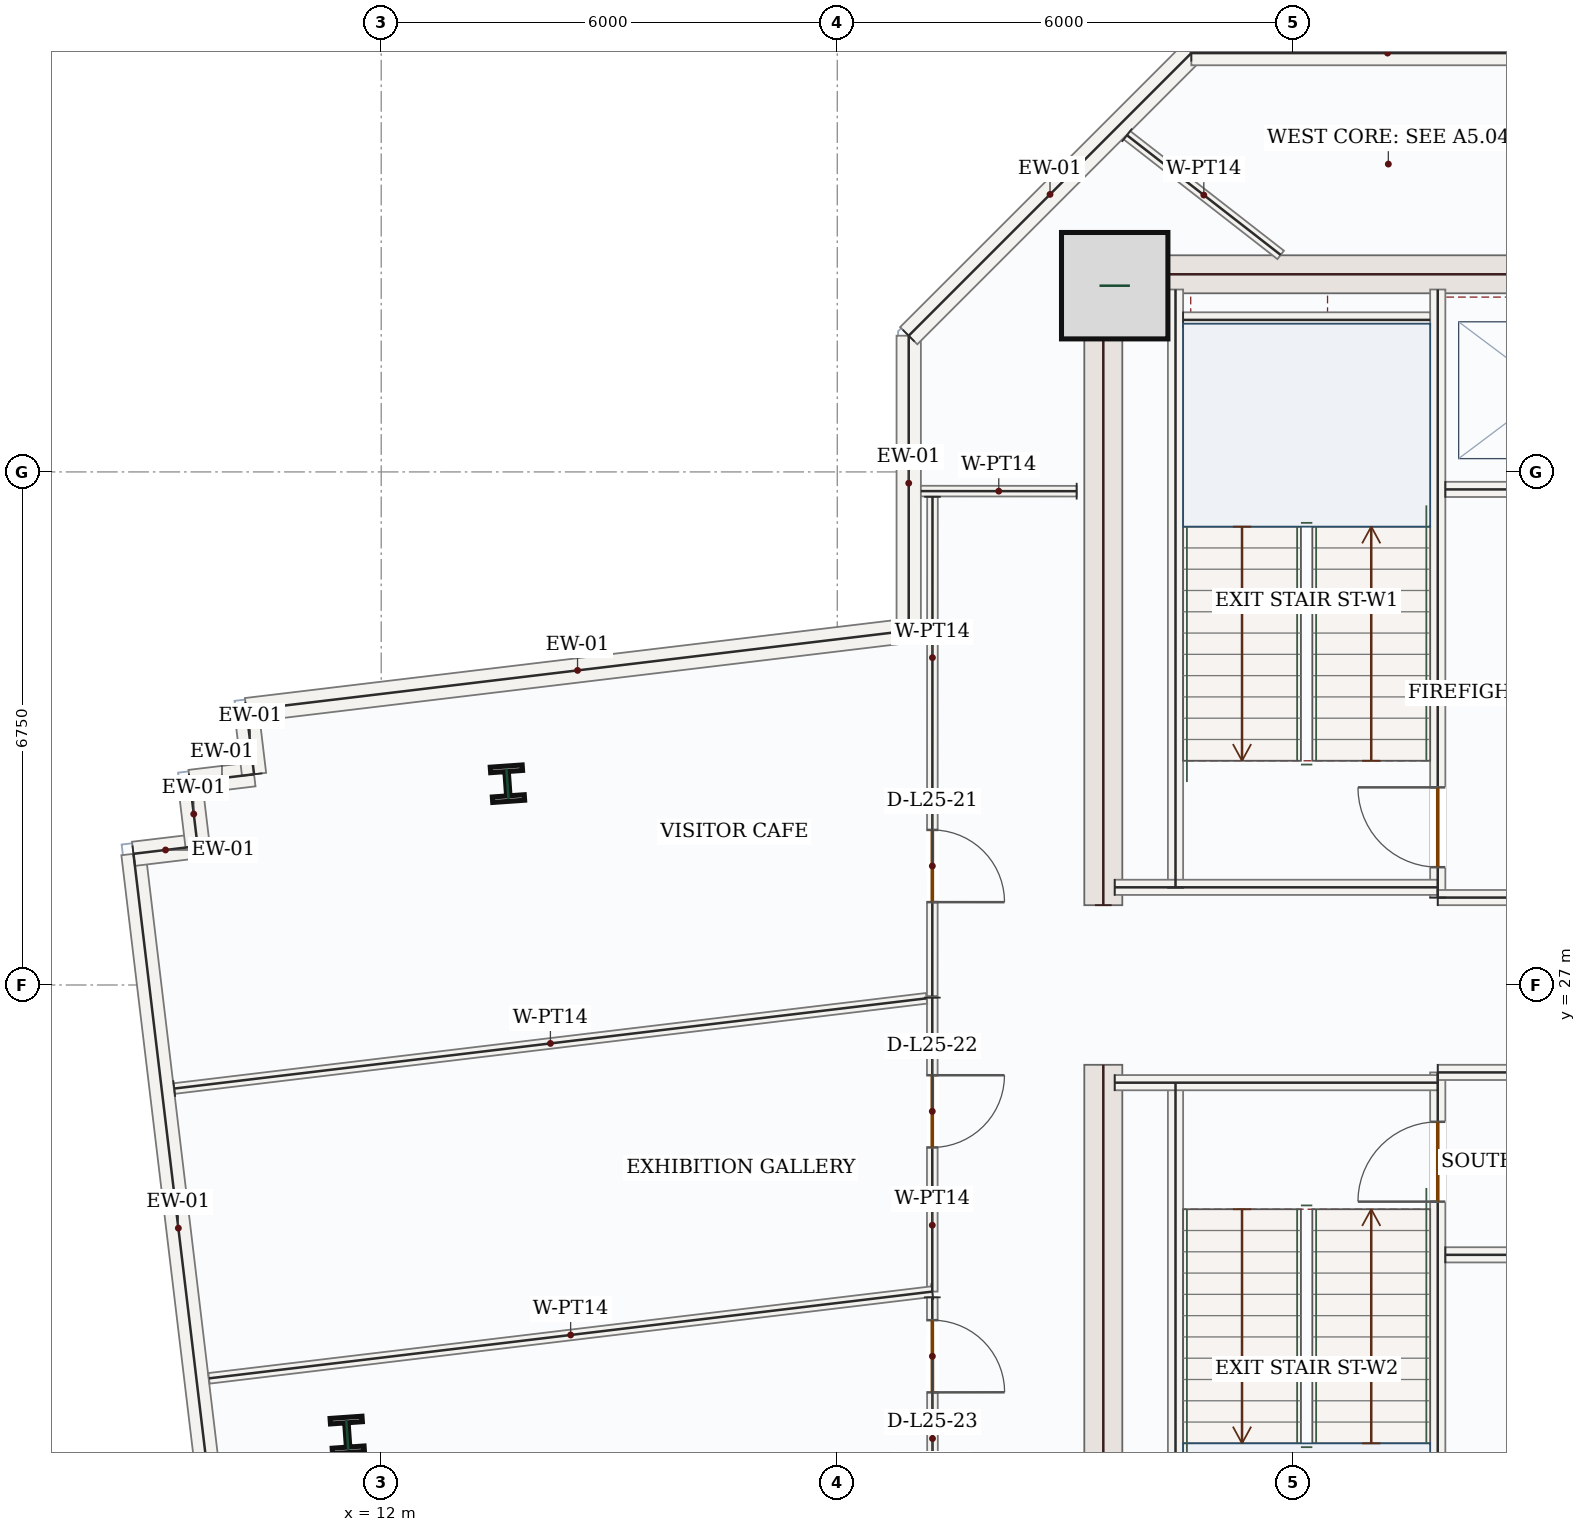
"""IFC4 building model, lengths in metres.
Left out: names, types, materials, properties, quantities, classifications, styles, units other than length and angle.
Written with IfcOpenShell. Run it as: python <this file> out.ifc"""

import sys

from ifc_helpers import new_model, si_unit, direction, frame, frame_2d, origin, origin_2d, place, context, subcontext, project, spatial, rectangle, i_section, extrude, source, transform, mapped, element, fill, save


model = new_model("IFC4")
c1 = context("Model", 3, precision=1e-05, world=origin(), true_north=direction((0.0, 1.0)))
c2 = subcontext(c1, "Body", "Model", "MODEL_VIEW")
j1 = project(units=[si_unit("LENGTHUNIT", "METRE"), si_unit("PLANEANGLEUNIT", "RADIAN")], contexts=[c1])
p1 = place(None, origin())
s1 = spatial("IfcSite", under=j1, at=p1, CompositionType="ELEMENT")
p2 = place(p1, origin())
s2 = spatial("IfcBuilding", under=s1, at=p2, CompositionType="ELEMENT")
p3 = place(p2, frame((0.0, 0.0, 113.1)))
s3 = spatial("IfcBuildingStorey", under=s2, at=p3, CompositionType="ELEMENT", Elevation=113.1)
m1 = source(origin(), c2, "Body", "SweptSolid", [
    extrude(rectangle(XDim=8.55, YDim=0.5, at=frame_2d((4.275, 0.0))), origin(), (0.0, 0.0, 1.0), 3.95),
])
for number, where, z_axis, x_axis in (
    (1, (21.5, 17.4, 0.0), (0.0, 0.0, 1.0), (0.0, 1.0, 0.0)),
    (2, (21.5, 28.05, 0.0), (0.0, 0.0, 1.0), (0.0, 1.0, 0.0)),
):
    element("IfcWall", number, at=place(p3, frame(where, z_axis=z_axis, x_axis=x_axis)), inside=s3, PredefinedType="SHEAR", context=c2, shape_type="MappedRepresentation", body=[
        mapped(m1, transform((0.0, 0.0, 0.0), x_axis=(1.0, 0.0, 0.0), y_axis=(0.0, 1.0, 0.0), z_axis=(0.0, 0.0, 1.0), scale=1.0)),
    ])
m2 = source(origin(), c2, "Body", "SweptSolid", [
    extrude(rectangle(XDim=7.0, YDim=0.5, at=frame_2d((3.5, 0.0))), origin(), (0.0, 0.0, 1.0), 3.95),
])
p4 = place(p3, frame((21.75, 36.35, 0.0), z_axis=(0.0, 0.0, 1.0), x_axis=(1.0, 0.0, 0.0)))
e3 = element("IfcWall", 3, at=p4, inside=s3, PredefinedType="SHEAR", context=c2, shape_type="MappedRepresentation", body=[
    mapped(m2, transform((0.0, 0.0, 0.0), x_axis=(1.0, 0.0, 0.0), y_axis=(0.0, 1.0, 0.0), z_axis=(0.0, 0.0, 1.0), scale=1.0)),
])
m3 = source(origin(), c2, "Body", "SweptSolid", [
    extrude(rectangle(XDim=1.4, YDim=1.4, at=origin_2d()), origin(), (0.0, 0.0, 1.0), 4.2),
])
p5 = place(p3, frame((21.65, 36.2, 0.0), z_axis=(0.0, 0.0, 1.0), x_axis=(1.0, 0.0, 0.0)))
e4 = element("IfcColumn", 4, at=p5, inside=s3, PredefinedType="COLUMN", context=c2, shape_type="MappedRepresentation", body=[
    mapped(m3, transform((0.0, 0.0, 0.0), x_axis=(1.0, 0.0, 0.0), y_axis=(0.0, 1.0, 0.0), z_axis=(0.0, 0.0, 1.0), scale=1.0)),
])
m4 = source(origin(), c2, "Body", "SweptSolid", [
    extrude(i_section(OverallWidth=0.421, OverallDepth=0.465, WebThickness=0.045, FlangeThickness=0.073, FilletRadius=0.018, at=origin_2d()), origin(), (0.0, 0.0, 1.0), 4.2),
])
for number, where, z_axis, x_axis in (
    (5, (13.661, 29.648, 0.0), (0.0, 0.0, 1.0), (0.998, 0.07, 0.0)),
    (6, (11.553, 21.08, 0.0), (0.0, 0.0, 1.0), (0.998, 0.07, 0.0)),
):
    element("IfcColumn", number, at=place(p3, frame(where, z_axis=z_axis, x_axis=x_axis)), inside=s3, PredefinedType="COLUMN", context=c2, shape_type="MappedRepresentation", body=[
        mapped(m4, transform((0.0, 0.0, 0.0), x_axis=(1.0, 0.0, 0.0), y_axis=(0.0, 1.0, 0.0), z_axis=(0.0, 0.0, 1.0), scale=1.0)),
    ])
m5 = source(origin(), c2, "Body", "SweptSolid", [
    extrude(rectangle(XDim=9.92, YDim=0.32, at=frame_2d((4.96, 0.0))), origin(), (0.0, 0.0, 1.0), 3.95),
])
p6 = place(p3, frame((9.922, 18.876, 0.0), z_axis=(0.0, 0.0, 1.0), x_axis=(-0.119092815244, 0.992883125729, 0.0)))
e7 = element("IfcWall", 7, at=p6, inside=s3, PredefinedType="SOLIDWALL", context=c2, shape_type="MappedRepresentation", body=[
    mapped(m5, transform((0.0, 0.0, 0.0), x_axis=(1.0, 0.0, 0.0), y_axis=(0.0, 1.0, 0.0), z_axis=(0.0, 0.0, 1.0), scale=1.0)),
])
m6 = source(origin(), c2, "Body", "SweptSolid", [
    extrude(rectangle(XDim=0.85, YDim=0.32, at=frame_2d((0.425, 0.0))), origin(), (0.0, 0.0, 1.0), 3.95),
])
for number, where, z_axis, x_axis in (
    (8, (8.74, 28.726, 0.0), (0.0, 0.0, 1.0), (0.993, 0.119, 0.0)),
    (9, (9.584, 28.827, 0.0), (0.0, 0.0, 1.0), (-0.119, 0.993, 0.0)),
    (10, (9.483, 29.671, 0.0), (0.0, 0.0, 1.0), (0.993, 0.119, 0.0)),
    (11, (10.327, 29.772, 0.0), (0.0, 0.0, 1.0), (-0.119, 0.993, 0.0)),
):
    element("IfcWall", number, at=place(p3, frame(where, z_axis=z_axis, x_axis=x_axis)), inside=s3, PredefinedType="SOLIDWALL", context=c2, shape_type="MappedRepresentation", body=[
        mapped(m6, transform((0.0, 0.0, 0.0), x_axis=(1.0, 0.0, 0.0), y_axis=(0.0, 1.0, 0.0), z_axis=(0.0, 0.0, 1.0), scale=1.0)),
    ])
m7 = source(origin(), c2, "Body", "SweptSolid", [
    extrude(rectangle(XDim=8.777, YDim=0.32, at=frame_2d((4.388, 0.0))), origin(), (0.0, 0.0, 1.0), 3.95),
])
p7 = place(p3, frame((10.226, 30.616, 0.0), z_axis=(0.0, 0.0, 1.0), x_axis=(0.992883944618, 0.119085987922, 0.0)))
e12 = element("IfcWall", 12, at=p7, inside=s3, PredefinedType="SOLIDWALL", context=c2, shape_type="MappedRepresentation", body=[
    mapped(m7, transform((0.0, 0.0, 0.0), x_axis=(1.0, 0.0, 0.0), y_axis=(0.0, 1.0, 0.0), z_axis=(0.0, 0.0, 1.0), scale=1.0)),
])
m8 = source(origin(), c2, "Body", "SweptSolid", [
    extrude(rectangle(XDim=3.881, YDim=0.32, at=frame_2d((1.94, 0.0))), origin(), (0.0, 0.0, 1.0), 3.95),
])
p8 = place(p3, frame((18.94, 31.661, 0.0), z_axis=(0.0, 0.0, 1.0), x_axis=(0.0, 1.0, 0.0)))
e13 = element("IfcWall", 13, at=p8, inside=s3, PredefinedType="SOLIDWALL", context=c2, shape_type="MappedRepresentation", body=[
    mapped(m8, transform((0.0, 0.0, 0.0), x_axis=(1.0, 0.0, 0.0), y_axis=(0.0, 1.0, 0.0), z_axis=(0.0, 0.0, 1.0), scale=1.0)),
])
m9 = source(origin(), c2, "Body", "SweptSolid", [
    extrude(rectangle(XDim=5.258, YDim=0.32, at=frame_2d((2.629, 0.0))), origin(), (0.0, 0.0, 1.0), 3.95),
])
p9 = place(p3, frame((18.94, 35.542, 0.0), z_axis=(0.0, 0.0, 1.0), x_axis=(0.707106781187, 0.707106781187, 0.0)))
e14 = element("IfcWall", 14, at=p9, inside=s3, PredefinedType="SOLIDWALL", context=c2, shape_type="MappedRepresentation", body=[
    mapped(m9, transform((0.0, 0.0, 0.0), x_axis=(1.0, 0.0, 0.0), y_axis=(0.0, 1.0, 0.0), z_axis=(0.0, 0.0, 1.0), scale=1.0)),
])
m10 = source(origin(), c2, "Body", "SweptSolid", [
    extrude(rectangle(XDim=5.164, YDim=0.32, at=frame_2d((2.582, 0.0))), origin(), (0.0, 0.0, 1.0), 3.95),
])
p10 = place(p3, frame((22.658, 39.26, 0.0), z_axis=(0.0, 0.0, 1.0), x_axis=(1.0, 0.0, 0.0)))
e15 = element("IfcWall", 15, at=p10, inside=s3, PredefinedType="SOLIDWALL", context=c2, shape_type="MappedRepresentation", body=[
    mapped(m10, transform((0.0, 0.0, 0.0), x_axis=(1.0, 0.0, 0.0), y_axis=(0.0, 1.0, 0.0), z_axis=(0.0, 0.0, 1.0), scale=1.0)),
])
m11 = source(origin(), c2, "Body", "SweptSolid", [
    extrude(rectangle(XDim=11.013, YDim=0.32, at=frame_2d((5.507, 0.0))), origin(), (0.0, 0.0, 1.0), 3.95),
])
p11 = place(p3, frame((27.822, 39.26, 0.0), z_axis=(0.0, 0.0, 1.0), x_axis=(-0.119086653457, 0.992883864794, 0.0)))
e16 = element("IfcWall", 16, at=p11, inside=s3, PredefinedType="SOLIDWALL", context=c2, shape_type="MappedRepresentation", body=[
    mapped(m11, transform((0.0, 0.0, 0.0), x_axis=(1.0, 0.0, 0.0), y_axis=(0.0, 1.0, 0.0), z_axis=(0.0, 0.0, 1.0), scale=1.0)),
])
m12 = source(origin(), c2, "Body", "SweptSolid", [
    extrude(rectangle(XDim=7.87, YDim=0.2, at=frame_2d((3.935, 0.0))), origin(), (0.0, 0.0, 1.0), 3.95),
])
for number, where, z_axis, x_axis in (
    (17, (22.45, 17.85, 0.0), (0.0, 0.0, 1.0), (0.0, 1.0, 0.0)),
    (18, (22.45, 28.28, 0.0), (0.0, 0.0, 1.0), (0.0, 1.0, 0.0)),
):
    element("IfcWall", number, at=place(p3, frame(where, z_axis=z_axis, x_axis=x_axis)), inside=s3, PredefinedType="SOLIDWALL", context=c2, shape_type="MappedRepresentation", body=[
        mapped(m12, transform((0.0, 0.0, 0.0), x_axis=(1.0, 0.0, 0.0), y_axis=(0.0, 1.0, 0.0), z_axis=(0.0, 0.0, 1.0), scale=1.0)),
    ])
p12 = place(p3, frame((25.9, 17.85, 0.0), z_axis=(0.0, 0.0, 1.0), x_axis=(0.0, 1.0, 0.0)))
e19 = element("IfcWall", 19, at=p12, inside=s3, PredefinedType="SOLIDWALL", context=c2, shape_type="SweptSolid", body=[
    extrude(rectangle(XDim=8.0, YDim=0.2, at=frame_2d((4.0, 0.0))), origin(), (0.0, 0.0, 1.0), 3.95),
])
p13 = place(p12, frame((6.3, 0.0, 0.0)))
e20 = element("IfcOpeningElement", 20, at=p13, cuts=e19, PredefinedType="OPENING", context=c2, shape_type="SweptSolid", body=[
    extrude(rectangle(XDim=1.05, YDim=2.15, at=frame_2d((0.525, 1.075))), frame((0.0, 0.11, 0.0), z_axis=(0.0, -1.0, 0.0), x_axis=(1.0, 0.0, 0.0)), (0.0, 0.0, 1.0), 0.22),
])
p14 = place(p3, frame((25.9, 28.15, 0.0), z_axis=(0.0, 0.0, 1.0), x_axis=(0.0, 1.0, 0.0)))
e21 = element("IfcWall", 21, at=p14, inside=s3, PredefinedType="SOLIDWALL", context=c2, shape_type="SweptSolid", body=[
    extrude(rectangle(XDim=8.0, YDim=0.2, at=frame_2d((4.0, 0.0))), origin(), (0.0, 0.0, 1.0), 3.95),
])
p15 = place(p14, frame((0.4, 0.0, 0.0)))
e22 = element("IfcOpeningElement", 22, at=p15, cuts=e21, PredefinedType="OPENING", context=c2, shape_type="SweptSolid", body=[
    extrude(rectangle(XDim=1.05, YDim=2.15, at=frame_2d((0.525, 1.075))), frame((0.0, 0.11, 0.0), z_axis=(0.0, -1.0, 0.0), x_axis=(1.0, 0.0, 0.0)), (0.0, 0.0, 1.0), 0.22),
])
m13 = source(origin(), c2, "Body", "SweptSolid", [
    extrude(rectangle(XDim=4.25, YDim=0.2, at=frame_2d((2.125, 0.0))), origin(), (0.0, 0.0, 1.0), 3.95),
])
p16 = place(p3, frame((21.65, 25.715, 0.0), z_axis=(0.0, 0.0, 1.0), x_axis=(1.0, 0.0, 0.0)))
e23 = element("IfcWall", 23, at=p16, inside=s3, PredefinedType="SOLIDWALL", context=c2, shape_type="MappedRepresentation", body=[
    mapped(m13, transform((0.0, 0.0, 0.0), x_axis=(1.0, 0.0, 0.0), y_axis=(0.0, 1.0, 0.0), z_axis=(0.0, 0.0, 1.0), scale=1.0)),
])
m14 = source(origin(), c2, "Body", "SweptSolid", [
    extrude(rectangle(XDim=3.0, YDim=0.2, at=frame_2d((1.5, 0.0))), origin(), (0.0, 0.0, 1.0), 3.95),
])
p17 = place(p3, frame((25.9, 25.85, 0.0), z_axis=(0.0, 0.0, 1.0), x_axis=(1.0, 0.0, 0.0)))
e24 = element("IfcWall", 24, at=p17, inside=s3, PredefinedType="SOLIDWALL", context=c2, shape_type="MappedRepresentation", body=[
    mapped(m14, transform((0.0, 0.0, 0.0), x_axis=(1.0, 0.0, 0.0), y_axis=(0.0, 1.0, 0.0), z_axis=(0.0, 0.0, 1.0), scale=1.0)),
])
p18 = place(p3, frame((21.65, 28.285, 0.0), z_axis=(0.0, 0.0, 1.0), x_axis=(1.0, 0.0, 0.0)))
e25 = element("IfcWall", 25, at=p18, inside=s3, PredefinedType="SOLIDWALL", context=c2, shape_type="MappedRepresentation", body=[
    mapped(m13, transform((0.0, 0.0, 0.0), x_axis=(1.0, 0.0, 0.0), y_axis=(0.0, 1.0, 0.0), z_axis=(0.0, 0.0, 1.0), scale=1.0)),
])
p19 = place(p3, frame((25.9, 28.15, 0.0), z_axis=(0.0, 0.0, 1.0), x_axis=(1.0, 0.0, 0.0)))
e26 = element("IfcWall", 26, at=p19, inside=s3, PredefinedType="SOLIDWALL", context=c2, shape_type="MappedRepresentation", body=[
    mapped(m14, transform((0.0, 0.0, 0.0), x_axis=(1.0, 0.0, 0.0), y_axis=(0.0, 1.0, 0.0), z_axis=(0.0, 0.0, 1.0), scale=1.0)),
])
m15 = source(origin(), c2, "Body", "SweptSolid", [
    extrude(rectangle(XDim=3.25, YDim=0.2, at=frame_2d((1.625, 0.0))), origin(), (0.0, 0.0, 1.0), 3.95),
])
p20 = place(p3, frame((22.55, 35.75, 0.0), z_axis=(0.0, 0.0, 1.0), x_axis=(1.0, 0.0, 0.0)))
e27 = element("IfcWall", 27, at=p20, inside=s3, PredefinedType="SOLIDWALL", context=c2, shape_type="MappedRepresentation", body=[
    mapped(m15, transform((0.0, 0.0, 0.0), x_axis=(1.0, 0.0, 0.0), y_axis=(0.0, 1.0, 0.0), z_axis=(0.0, 0.0, 1.0), scale=1.0)),
])
p21 = place(p3, frame((26.0, 33.52, 0.0), z_axis=(0.0, 0.0, 1.0), x_axis=(1.0, 0.0, 0.0)))
e28 = element("IfcWall", 28, at=p21, inside=s3, PredefinedType="SOLIDWALL", context=c2, shape_type="SweptSolid", body=[
    extrude(rectangle(XDim=2.75, YDim=0.2, at=frame_2d((1.375, 0.0))), origin(), (0.0, 0.0, 1.0), 3.95),
])
p22 = place(p21, frame((0.82, 0.0, 0.0)))
e29 = element("IfcOpeningElement", 29, at=p22, cuts=e28, PredefinedType="OPENING", context=c2, shape_type="SweptSolid", body=[
    extrude(rectangle(XDim=1.1, YDim=2.15, at=frame_2d((0.55, 1.075))), frame((0.0, 0.11, 0.0), z_axis=(0.0, -1.0, 0.0), x_axis=(1.0, 0.0, 0.0)), (0.0, 0.0, 1.0), 0.22),
])
m16 = source(origin(), c2, "Body", "SweptSolid", [
    extrude(rectangle(XDim=2.75, YDim=0.2, at=frame_2d((1.375, 0.0))), origin(), (0.0, 0.0, 1.0), 3.95),
])
p23 = place(p3, frame((26.0, 23.45, 0.0), z_axis=(0.0, 0.0, 1.0), x_axis=(1.0, 0.0, 0.0)))
e30 = element("IfcWall", 30, at=p23, inside=s3, PredefinedType="SOLIDWALL", context=c2, shape_type="MappedRepresentation", body=[
    mapped(m16, transform((0.0, 0.0, 0.0), x_axis=(1.0, 0.0, 0.0), y_axis=(0.0, 1.0, 0.0), z_axis=(0.0, 0.0, 1.0), scale=1.0)),
])
p24 = place(p3, frame((19.25, 26.834, 0.0), z_axis=(0.0, 0.0, 1.0), x_axis=(0.0, -1.0, 0.0)))
e31 = element("IfcWall", 31, at=p24, inside=s3, PredefinedType="PARTITIONING", context=c2, shape_type="SweptSolid", body=[
    extrude(rectangle(XDim=3.868, YDim=0.14, at=frame_2d((1.934, 0.0))), origin(), (0.0, 0.0, 1.0), 3.95),
])
p25 = place(p24, frame((1.021, 0.0, 0.0)))
e32 = element("IfcOpeningElement", 32, at=p25, cuts=e31, PredefinedType="OPENING", context=c2, shape_type="SweptSolid", body=[
    extrude(rectangle(XDim=0.95, YDim=2.15, at=frame_2d((0.475, 1.075))), frame((0.0, 0.08, 0.0), z_axis=(0.0, -1.0, 0.0), x_axis=(1.0, 0.0, 0.0)), (0.0, 0.0, 1.0), 0.16),
])
m17 = source(origin(), c2, "Body", "SweptSolid", [
    extrude(rectangle(XDim=9.584, YDim=0.14, at=frame_2d((4.792, 0.0))), origin(), (0.0, 0.0, 1.0), 3.95),
])
p26 = place(p3, frame((19.25, 22.966, 0.0), z_axis=(0.0, 0.0, 1.0), x_axis=(-0.992883225705, -0.119091981737, 0.0)))
e33 = element("IfcWall", 33, at=p26, inside=s3, PredefinedType="PARTITIONING", context=c2, shape_type="MappedRepresentation", body=[
    mapped(m17, transform((0.0, 0.0, 0.0), x_axis=(1.0, 0.0, 0.0), y_axis=(0.0, 1.0, 0.0), z_axis=(0.0, 0.0, 1.0), scale=1.0)),
])
m18 = source(origin(), c2, "Body", "SweptSolid", [
    extrude(rectangle(XDim=9.969, YDim=0.14, at=frame_2d((4.984, 0.0))), origin(), (0.0, 0.0, 1.0), 3.95),
])
p27 = place(p3, frame((9.277, 25.638, 0.0), z_axis=(0.0, 0.0, 1.0), x_axis=(0.992882747367, 0.119095969623, 0.0)))
e34 = element("IfcWall", 34, at=p27, inside=s3, PredefinedType="PARTITIONING", context=c2, shape_type="MappedRepresentation", body=[
    mapped(m18, transform((0.0, 0.0, 0.0), x_axis=(1.0, 0.0, 0.0), y_axis=(0.0, 1.0, 0.0), z_axis=(0.0, 0.0, 1.0), scale=1.0)),
])
m19 = source(origin(), c2, "Body", "SweptSolid", [
    extrude(rectangle(XDim=2.049, YDim=0.14, at=frame_2d((1.025, 0.0))), origin(), (0.0, 0.0, 1.0), 3.95),
])
p28 = place(p3, frame((21.149, 33.497, 0.0), z_axis=(0.0, 0.0, 1.0), x_axis=(-0.999999822593, 0.000595663464, 0.0)))
e35 = element("IfcWall", 35, at=p28, inside=s3, PredefinedType="PARTITIONING", context=c2, shape_type="MappedRepresentation", body=[
    mapped(m19, transform((0.0, 0.0, 0.0), x_axis=(1.0, 0.0, 0.0), y_axis=(0.0, 1.0, 0.0), z_axis=(0.0, 0.0, 1.0), scale=1.0)),
])
p29 = place(p3, frame((19.253, 33.423, 0.0), z_axis=(0.0, 0.0, 1.0), x_axis=(-0.000408845905, -0.999999916423, 0.0)))
e36 = element("IfcWall", 36, at=p29, inside=s3, PredefinedType="PARTITIONING", context=c2, shape_type="SweptSolid", body=[
    extrude(rectangle(XDim=6.569, YDim=0.14, at=frame_2d((3.284, 0.0))), origin(), (0.0, 0.0, 1.0), 3.95),
])
p30 = place(p29, frame((4.382, 0.0, 0.0)))
e37 = element("IfcOpeningElement", 37, at=p30, cuts=e36, PredefinedType="OPENING", context=c2, shape_type="SweptSolid", body=[
    extrude(rectangle(XDim=0.95, YDim=2.15, at=frame_2d((0.475, 1.075))), frame((0.0, 0.08, 0.0), z_axis=(0.0, -1.0, 0.0), x_axis=(1.0, 0.0, 0.0)), (0.0, 0.0, 1.0), 0.16),
])
m20 = source(origin(), c2, "Body", "SweptSolid", [
    extrude(rectangle(XDim=2.563, YDim=0.14, at=frame_2d((1.282, 0.0))), origin(), (0.0, 0.0, 1.0), 3.95),
])
p31 = place(p3, frame((21.811, 38.18, 0.0), z_axis=(0.0, 0.0, 1.0), x_axis=(0.789034129839, -0.614349364734, 0.0)))
e38 = element("IfcWall", 38, at=p31, inside=s3, PredefinedType="PARTITIONING", context=c2, shape_type="MappedRepresentation", body=[
    mapped(m20, transform((0.0, 0.0, 0.0), x_axis=(1.0, 0.0, 0.0), y_axis=(0.0, 1.0, 0.0), z_axis=(0.0, 0.0, 1.0), scale=1.0)),
])
p32 = place(p3, frame((19.25, 22.891, 0.0), z_axis=(0.0, 0.0, 1.0), x_axis=(0.001476168784, -0.999998910462, 0.0)))
e39 = element("IfcWall", 39, at=p32, inside=s3, PredefinedType="PARTITIONING", context=c2, shape_type="SweptSolid", body=[
    extrude(rectangle(XDim=2.315, YDim=0.14, at=frame_2d((1.158, 0.0))), origin(), (0.0, 0.0, 1.0), 3.95),
])
p33 = place(p32, frame((0.3, 0.0, 0.0)))
e40 = element("IfcOpeningElement", 40, at=p33, cuts=e39, PredefinedType="OPENING", context=c2, shape_type="SweptSolid", body=[
    extrude(rectangle(XDim=0.95, YDim=2.15, at=frame_2d((0.475, 1.075))), frame((0.0, 0.08, 0.0), z_axis=(0.0, -1.0, 0.0), x_axis=(1.0, 0.0, 0.0)), (0.0, 0.0, 1.0), 0.16),
])
m21 = source(origin(), c2, "Body", "SweptSolid", [
    extrude(rectangle(XDim=1.05, YDim=2.15, at=frame_2d((0.525, 1.075))), frame((0.0, 0.025, 0.0), z_axis=(0.0, -1.0, 0.0), x_axis=(1.0, 0.0, 0.0)), (0.0, 0.0, 1.0), 0.05),
])
p34 = place(p15, origin())
e41 = element("IfcDoor", 41, at=p34, inside=s3, OperationType="SINGLE_SWING_RIGHT", PredefinedType="DOOR", context=c2, shape_type="MappedRepresentation", body=[
    mapped(m21, transform((0.0, 0.0, 0.0), x_axis=(1.0, 0.0, 0.0), y_axis=(0.0, 1.0, 0.0), z_axis=(0.0, 0.0, 1.0), scale=1.0)),
])
fill(e22, e41)
p35 = place(p13, origin())
e42 = element("IfcDoor", 42, at=p35, inside=s3, OperationType="SINGLE_SWING_LEFT", PredefinedType="DOOR", context=c2, shape_type="MappedRepresentation", body=[
    mapped(m21, transform((0.0, 0.0, 0.0), x_axis=(1.0, 0.0, 0.0), y_axis=(0.0, 1.0, 0.0), z_axis=(0.0, 0.0, 1.0), scale=1.0)),
])
fill(e20, e42)
m22 = source(origin(), c2, "Body", "SweptSolid", [
    extrude(rectangle(XDim=0.95, YDim=2.15, at=frame_2d((0.475, 1.075))), frame((0.0, 0.025, 0.0), z_axis=(0.0, -1.0, 0.0), x_axis=(1.0, 0.0, 0.0)), (0.0, 0.0, 1.0), 0.05),
])
p36 = place(p30, origin())
e43 = element("IfcDoor", 43, at=p36, inside=s3, OperationType="SINGLE_SWING_RIGHT", PredefinedType="DOOR", context=c2, shape_type="MappedRepresentation", body=[
    mapped(m22, transform((0.0, 0.0, 0.0), x_axis=(1.0, 0.0, 0.0), y_axis=(0.0, 1.0, 0.0), z_axis=(0.0, 0.0, 1.0), scale=1.0)),
])
fill(e37, e43)
p37 = place(p25, origin())
e44 = element("IfcDoor", 44, at=p37, inside=s3, OperationType="SINGLE_SWING_LEFT", PredefinedType="DOOR", context=c2, shape_type="MappedRepresentation", body=[
    mapped(m22, transform((0.0, 0.0, 0.0), x_axis=(1.0, 0.0, 0.0), y_axis=(0.0, 1.0, 0.0), z_axis=(0.0, 0.0, 1.0), scale=1.0)),
])
fill(e32, e44)
p38 = place(p33, origin())
e45 = element("IfcDoor", 45, at=p38, inside=s3, OperationType="SINGLE_SWING_RIGHT", PredefinedType="DOOR", context=c2, shape_type="MappedRepresentation", body=[
    mapped(m22, transform((0.0, 0.0, 0.0), x_axis=(1.0, 0.0, 0.0), y_axis=(0.0, 1.0, 0.0), z_axis=(0.0, 0.0, 1.0), scale=1.0)),
])
fill(e40, e45)
save(model, sys.argv[1])
